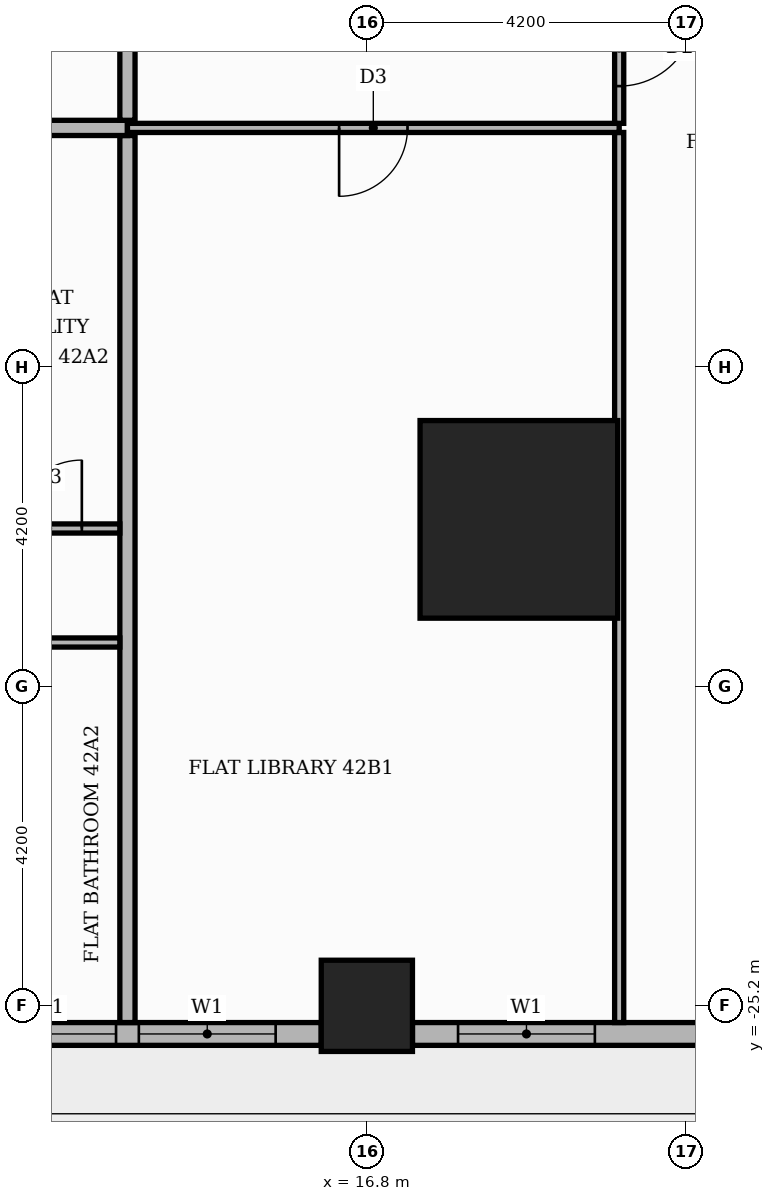
"""IFC4 building model, lengths in metres.
Left out: names, types, materials, properties, quantities, classifications, styles, units other than length and angle.
Written with IfcOpenShell. Run it as: python <this file> out.ifc"""

import sys

from ifc_helpers import new_model, si_unit, direction, frame, frame_2d, origin, origin_2d, place, context, subcontext, project, spatial, rectangle, extrude, element, fill, save


model = new_model("IFC4")
c1 = context("Model", 3, precision=1e-05, world=origin(), true_north=direction((0.0, 1.0)))
c2 = subcontext(c1, "Body", "Model", "MODEL_VIEW")
j1 = project(units=[si_unit("LENGTHUNIT", "METRE"), si_unit("PLANEANGLEUNIT", "RADIAN")], contexts=[c1])
p1 = place(None, origin())
s1 = spatial("IfcSite", under=j1, at=p1, CompositionType="ELEMENT")
p2 = place(p1, origin())
s2 = spatial("IfcBuilding", under=s1, at=p2, CompositionType="ELEMENT")
p3 = place(p2, frame((0.0, 0.0, 176.7)))
s3 = spatial("IfcBuildingStorey", under=s2, at=p3, CompositionType="ELEMENT", Elevation=176.7)
p4 = place(p3, frame((18.8, -18.8, 0.0), z_axis=(0.0, 0.0, 1.0), x_axis=(1.0, 0.0, 0.0)))
e1 = element("IfcColumn", 1, at=p4, inside=s3, PredefinedType="COLUMN", context=c2, shape_type="SweptSolid", body=[
    extrude(rectangle(XDim=2.6, YDim=2.6, at=origin_2d()), origin(), (0.0, 0.0, 1.0), 3.9),
])
p5 = place(p3, frame((16.8, -25.2, 0.0), z_axis=(0.0, 0.0, 1.0), x_axis=(1.0, 0.0, 0.0)))
e2 = element("IfcColumn", 2, at=p5, inside=s3, PredefinedType="COLUMN", context=c2, shape_type="SweptSolid", body=[
    extrude(rectangle(XDim=1.2, YDim=1.2, at=origin_2d()), origin(), (0.0, 0.0, 1.0), 3.9),
])
p6 = place(p3, frame((9.0, -25.57, 0.0), z_axis=(0.0, 0.0, 1.0), x_axis=(1.0, 0.0, 0.0)))
e3 = element("IfcWall", 3, at=p6, inside=s3, PredefinedType="STANDARD", context=c2, shape_type="SweptSolid", body=[
    extrude(rectangle(XDim=7.2, YDim=0.3, at=frame_2d((3.6, 0.0))), origin(), (0.0, 0.0, 1.0), 3.4),
])
p7 = place(p6, frame((0.6, 0.0, 0.9)))
e4 = element("IfcOpeningElement", 4, at=p7, cuts=e3, PredefinedType="OPENING", context=c2, shape_type="SweptSolid", body=[
    extrude(rectangle(XDim=1.8, YDim=2.1, at=frame_2d((0.9, 1.05))), frame((0.0, 0.16, 0.0), z_axis=(0.0, -1.0, 0.0), x_axis=(1.0, 0.0, 0.0)), (0.0, 0.0, 1.0), 0.32),
])
p8 = place(p6, frame((2.7, 0.0, 0.9)))
e5 = element("IfcOpeningElement", 5, at=p8, cuts=e3, PredefinedType="OPENING", context=c2, shape_type="SweptSolid", body=[
    extrude(rectangle(XDim=1.8, YDim=2.1, at=frame_2d((0.9, 1.05))), frame((0.0, 0.16, 0.0), z_axis=(0.0, -1.0, 0.0), x_axis=(1.0, 0.0, 0.0)), (0.0, 0.0, 1.0), 0.32),
])
p9 = place(p6, frame((4.8, 0.0, 0.9)))
e6 = element("IfcOpeningElement", 6, at=p9, cuts=e3, PredefinedType="OPENING", context=c2, shape_type="SweptSolid", body=[
    extrude(rectangle(XDim=1.8, YDim=2.1, at=frame_2d((0.9, 1.05))), frame((0.0, 0.16, 0.0), z_axis=(0.0, -1.0, 0.0), x_axis=(1.0, 0.0, 0.0)), (0.0, 0.0, 1.0), 0.32),
])
p10 = place(p3, frame((17.4, -25.57, 0.0), z_axis=(0.0, 0.0, 1.0), x_axis=(1.0, 0.0, 0.0)))
e7 = element("IfcWall", 7, at=p10, inside=s3, PredefinedType="STANDARD", context=c2, shape_type="SweptSolid", body=[
    extrude(rectangle(XDim=4.32, YDim=0.3, at=frame_2d((2.16, 0.0))), origin(), (0.0, 0.0, 1.0), 3.4),
])
p11 = place(p10, frame((0.6, 0.0, 0.9)))
e8 = element("IfcOpeningElement", 8, at=p11, cuts=e7, PredefinedType="OPENING", context=c2, shape_type="SweptSolid", body=[
    extrude(rectangle(XDim=1.8, YDim=2.1, at=frame_2d((0.9, 1.05))), frame((0.0, 0.16, 0.0), z_axis=(0.0, -1.0, 0.0), x_axis=(1.0, 0.0, 0.0)), (0.0, 0.0, 1.0), 0.32),
])
p12 = place(p3, frame((13.65, -25.42, 0.0), z_axis=(0.0, 0.0, 1.0), x_axis=(0.0, 1.0, 0.0)))
e9 = element("IfcWall", 9, at=p12, inside=s3, PredefinedType="PARTITIONING", context=c2, shape_type="SweptSolid", body=[
    extrude(rectangle(XDim=11.67, YDim=0.2, at=frame_2d((5.835, 0.0))), origin(), (0.0, 0.0, 1.0), 3.4),
])
p13 = place(p3, frame((20.12, -25.42, 0.0), z_axis=(0.0, 0.0, 1.0), x_axis=(0.0, 1.0, 0.0)))
e10 = element("IfcWall", 10, at=p13, inside=s3, PredefinedType="PARTITIONING", context=c2, shape_type="SweptSolid", body=[
    extrude(rectangle(XDim=11.71, YDim=0.12, at=frame_2d((5.855, 0.0))), origin(), (0.0, 0.0, 1.0), 3.4),
])
p14 = place(p3, frame((-5.15, -20.42, 0.0), z_axis=(0.0, 0.0, 1.0), x_axis=(1.0, 0.0, 0.0)))
e11 = element("IfcWall", 11, at=p14, inside=s3, PredefinedType="PARTITIONING", context=c2, shape_type="SweptSolid", body=[
    extrude(rectangle(XDim=18.7, YDim=0.12, at=frame_2d((9.35, 0.0))), origin(), (0.0, 0.0, 1.0), 3.4),
])
p15 = place(p14, frame((1.5, 0.0, 0.0)))
e12 = element("IfcOpeningElement", 12, at=p15, cuts=e11, PredefinedType="OPENING", context=c2, shape_type="SweptSolid", body=[
    extrude(rectangle(XDim=1.0, YDim=2.1, at=frame_2d((0.5, 1.05))), frame((0.0, 0.07, 0.0), z_axis=(0.0, -1.0, 0.0), x_axis=(1.0, 0.0, 0.0)), (0.0, 0.0, 1.0), 0.14),
])
p16 = place(p14, frame((5.75, 0.0, 0.0)))
e13 = element("IfcOpeningElement", 13, at=p16, cuts=e11, PredefinedType="OPENING", context=c2, shape_type="SweptSolid", body=[
    extrude(rectangle(XDim=0.9, YDim=2.1, at=frame_2d((0.45, 1.05))), frame((0.0, 0.07, 0.0), z_axis=(0.0, -1.0, 0.0), x_axis=(1.0, 0.0, 0.0)), (0.0, 0.0, 1.0), 0.14),
])
p17 = place(p14, frame((14.15, 0.0, 0.0)))
e14 = element("IfcOpeningElement", 14, at=p17, cuts=e11, PredefinedType="OPENING", context=c2, shape_type="SweptSolid", body=[
    extrude(rectangle(XDim=0.9, YDim=2.1, at=frame_2d((0.45, 1.05))), frame((0.0, 0.07, 0.0), z_axis=(0.0, -1.0, 0.0), x_axis=(1.0, 0.0, 0.0)), (0.0, 0.0, 1.0), 0.14),
])
p18 = place(p3, frame((-1.05, -18.92, 0.0), z_axis=(0.0, 0.0, 1.0), x_axis=(1.0, 0.0, 0.0)))
e15 = element("IfcWall", 15, at=p18, inside=s3, PredefinedType="PARTITIONING", context=c2, shape_type="SweptSolid", body=[
    extrude(rectangle(XDim=14.6, YDim=0.12, at=frame_2d((7.3, 0.0))), origin(), (0.0, 0.0, 1.0), 3.4),
])
p19 = place(p18, frame((2.7, 0.0, 0.0)))
e16 = element("IfcOpeningElement", 16, at=p19, cuts=e15, PredefinedType="OPENING", context=c2, shape_type="SweptSolid", body=[
    extrude(rectangle(XDim=0.9, YDim=2.1, at=frame_2d((0.45, 1.05))), frame((0.0, 0.07, 0.0), z_axis=(0.0, -1.0, 0.0), x_axis=(1.0, 0.0, 0.0)), (0.0, 0.0, 1.0), 0.14),
])
p20 = place(p18, frame((7.05, 0.0, 0.0)))
e17 = element("IfcOpeningElement", 17, at=p20, cuts=e15, PredefinedType="OPENING", context=c2, shape_type="SweptSolid", body=[
    extrude(rectangle(XDim=0.9, YDim=2.1, at=frame_2d((0.45, 1.05))), frame((0.0, 0.07, 0.0), z_axis=(0.0, -1.0, 0.0), x_axis=(1.0, 0.0, 0.0)), (0.0, 0.0, 1.0), 0.14),
])
p21 = place(p18, frame((10.2, 0.0, 0.0)))
e18 = element("IfcOpeningElement", 18, at=p21, cuts=e15, PredefinedType="OPENING", context=c2, shape_type="SweptSolid", body=[
    extrude(rectangle(XDim=0.9, YDim=2.1, at=frame_2d((0.45, 1.05))), frame((0.0, 0.07, 0.0), z_axis=(0.0, -1.0, 0.0), x_axis=(1.0, 0.0, 0.0)), (0.0, 0.0, 1.0), 0.14),
])
p22 = place(p18, frame((13.2, 0.0, 0.0)))
e19 = element("IfcOpeningElement", 19, at=p22, cuts=e15, PredefinedType="OPENING", context=c2, shape_type="SweptSolid", body=[
    extrude(rectangle(XDim=0.9, YDim=2.1, at=frame_2d((0.45, 1.05))), frame((0.0, 0.07, 0.0), z_axis=(0.0, -1.0, 0.0), x_axis=(1.0, 0.0, 0.0)), (0.0, 0.0, 1.0), 0.14),
])
p23 = place(p3, frame((-25.42, -13.65, 0.0), z_axis=(0.0, 0.0, 1.0), x_axis=(1.0, 0.0, 0.0)))
e20 = element("IfcWall", 20, at=p23, inside=s3, PredefinedType="PARTITIONING", context=c2, shape_type="SweptSolid", body=[
    extrude(rectangle(XDim=39.07, YDim=0.2, at=frame_2d((19.535, 0.0))), origin(), (0.0, 0.0, 1.0), 3.4),
])
p24 = place(p23, frame((13.32, 0.0, 0.0)))
e21 = element("IfcOpeningElement", 21, at=p24, cuts=e20, PredefinedType="OPENING", context=c2, shape_type="SweptSolid", body=[
    extrude(rectangle(XDim=1.1, YDim=2.4, at=frame_2d((0.55, 1.2))), frame((0.0, 0.11, 0.0), z_axis=(0.0, -1.0, 0.0), x_axis=(1.0, 0.0, 0.0)), (0.0, 0.0, 1.0), 0.22),
])
p25 = place(p23, frame((21.72, 0.0, 0.0)))
e22 = element("IfcOpeningElement", 22, at=p25, cuts=e20, PredefinedType="OPENING", context=c2, shape_type="SweptSolid", body=[
    extrude(rectangle(XDim=1.1, YDim=2.4, at=frame_2d((0.55, 1.2))), frame((0.0, 0.11, 0.0), z_axis=(0.0, -1.0, 0.0), x_axis=(1.0, 0.0, 0.0)), (0.0, 0.0, 1.0), 0.22),
])
p26 = place(p3, frame((13.65, -13.65, 0.0), z_axis=(0.0, 0.0, 1.0), x_axis=(1.0, 0.0, 0.0)))
e23 = element("IfcWall", 23, at=p26, inside=s3, PredefinedType="PARTITIONING", context=c2, shape_type="SweptSolid", body=[
    extrude(rectangle(XDim=6.47, YDim=0.12, at=frame_2d((3.235, 0.0))), origin(), (0.0, 0.0, 1.0), 3.4),
])
p27 = place(p26, frame((2.785, 0.0, 0.0)))
e24 = element("IfcOpeningElement", 24, at=p27, cuts=e23, PredefinedType="OPENING", context=c2, shape_type="SweptSolid", body=[
    extrude(rectangle(XDim=0.9, YDim=2.1, at=frame_2d((0.45, 1.05))), frame((0.0, 0.07, 0.0), z_axis=(0.0, -1.0, 0.0), x_axis=(1.0, 0.0, 0.0)), (0.0, 0.0, 1.0), 0.14),
])
p28 = place(p3, frame((20.12, -13.59, 0.0), z_axis=(0.0, 0.0, 1.0), x_axis=(0.0, 1.0, 0.0)))
e25 = element("IfcWall", 25, at=p28, inside=s3, PredefinedType="PARTITIONING", context=c2, shape_type="SweptSolid", body=[
    extrude(rectangle(XDim=1.98, YDim=0.12, at=frame_2d((0.99, 0.0))), origin(), (0.0, 0.0, 1.0), 3.4),
])
p29 = place(p28, frame((0.49, 0.0, 0.0)))
e26 = element("IfcOpeningElement", 26, at=p29, cuts=e25, PredefinedType="OPENING", context=c2, shape_type="SweptSolid", body=[
    extrude(rectangle(XDim=1.0, YDim=2.1, at=frame_2d((0.5, 1.05))), frame((0.0, 0.07, 0.0), z_axis=(0.0, -1.0, 0.0), x_axis=(1.0, 0.0, 0.0)), (0.0, 0.0, 1.0), 0.14),
])
p30 = place(p3, frame((13.65, -13.55, 0.0), z_axis=(0.0, 0.0, 1.0), x_axis=(0.0, 1.0, 0.0)))
e27 = element("IfcWall", 27, at=p30, inside=s3, PredefinedType="PARTITIONING", context=c2, shape_type="SweptSolid", body=[
    extrude(rectangle(XDim=2.45, YDim=0.2, at=frame_2d((1.225, 0.0))), origin(), (0.0, 0.0, 1.0), 3.4),
])
p31 = place(p8, origin())
e28 = element("IfcWindow", 28, at=p31, inside=s3, PartitioningType="SINGLE_PANEL", PredefinedType="WINDOW", context=c2, shape_type="SweptSolid", body=[
    extrude(rectangle(XDim=1.8, YDim=2.1, at=frame_2d((0.9, 1.05))), frame((0.0, 0.03, 0.0), z_axis=(0.0, -1.0, 0.0), x_axis=(1.0, 0.0, 0.0)), (0.0, 0.0, 1.0), 0.06),
])
fill(e5, e28)
p32 = place(p9, origin())
e29 = element("IfcWindow", 29, at=p32, inside=s3, PartitioningType="SINGLE_PANEL", PredefinedType="WINDOW", context=c2, shape_type="SweptSolid", body=[
    extrude(rectangle(XDim=1.8, YDim=2.1, at=frame_2d((0.9, 1.05))), frame((0.0, 0.03, 0.0), z_axis=(0.0, -1.0, 0.0), x_axis=(1.0, 0.0, 0.0)), (0.0, 0.0, 1.0), 0.06),
])
fill(e6, e29)
p33 = place(p11, origin())
e30 = element("IfcWindow", 30, at=p33, inside=s3, PartitioningType="SINGLE_PANEL", PredefinedType="WINDOW", context=c2, shape_type="SweptSolid", body=[
    extrude(rectangle(XDim=1.8, YDim=2.1, at=frame_2d((0.9, 1.05))), frame((0.0, 0.03, 0.0), z_axis=(0.0, -1.0, 0.0), x_axis=(1.0, 0.0, 0.0)), (0.0, 0.0, 1.0), 0.06),
])
fill(e8, e30)
p34 = place(p22, origin())
e31 = element("IfcDoor", 31, at=p34, inside=s3, OperationType="SINGLE_SWING_RIGHT", PredefinedType="DOOR", context=c2, shape_type="SweptSolid", body=[
    extrude(rectangle(XDim=0.9, YDim=2.1, at=frame_2d((0.45, 1.05))), frame((0.0, 0.025, 0.0), z_axis=(0.0, -1.0, 0.0), x_axis=(1.0, 0.0, 0.0)), (0.0, 0.0, 1.0), 0.05),
])
fill(e19, e31)
p35 = place(p27, frame((0.9, 0.0, 0.0), z_axis=(0.0, 0.0, 1.0), x_axis=(-1.0, 0.0, 0.0)))
e32 = element("IfcDoor", 32, at=p35, inside=s3, OperationType="SINGLE_SWING_LEFT", PredefinedType="DOOR", context=c2, shape_type="SweptSolid", body=[
    extrude(rectangle(XDim=0.9, YDim=2.1, at=frame_2d((0.45, 1.05))), frame((0.0, 0.025, 0.0), z_axis=(0.0, -1.0, 0.0), x_axis=(1.0, 0.0, 0.0)), (0.0, 0.0, 1.0), 0.05),
])
fill(e24, e32)
p36 = place(p29, frame((1.0, 0.0, 0.0), z_axis=(0.0, 0.0, 1.0), x_axis=(-1.0, 0.0, 0.0)))
e33 = element("IfcDoor", 33, at=p36, inside=s3, OperationType="SINGLE_SWING_RIGHT", PredefinedType="DOOR", context=c2, shape_type="SweptSolid", body=[
    extrude(rectangle(XDim=1.0, YDim=2.1, at=frame_2d((0.5, 1.05))), frame((0.0, 0.025, 0.0), z_axis=(0.0, -1.0, 0.0), x_axis=(1.0, 0.0, 0.0)), (0.0, 0.0, 1.0), 0.05),
])
fill(e26, e33)
save(model, sys.argv[1])
